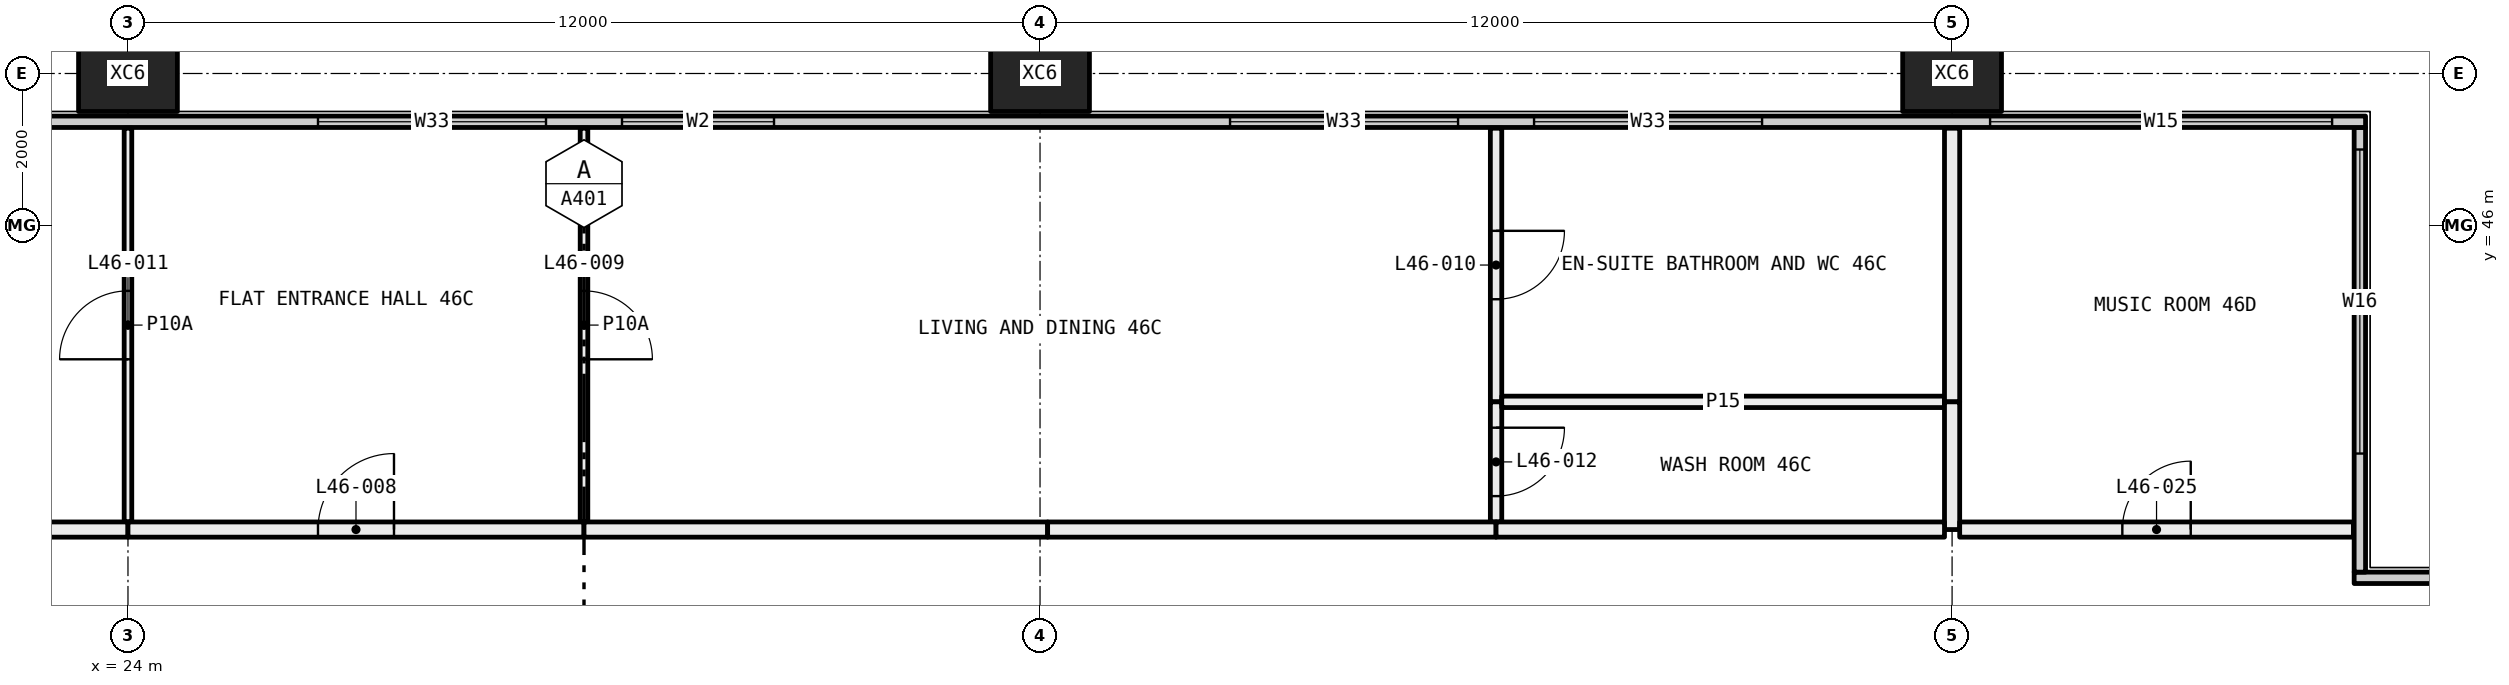
"""IFC4 building model, lengths in metres.
Left out: names, types, materials, properties, quantities, classifications, styles, units other than length and angle.
Written with IfcOpenShell. Run it as: python <this file> out.ifc"""

import sys

from ifc_helpers import new_model, si_unit, direction, frame, frame_2d, origin, origin_2d, place, context, subcontext, project, spatial, rectangle, hollow_rectangle, extrude, element, fill, save


model = new_model("IFC4")
c1 = context("Model", 3, precision=1e-05, world=origin(), true_north=direction((0.0, 1.0)))
c2 = subcontext(c1, "Body", "Model", "MODEL_VIEW")
j1 = project(units=[si_unit("LENGTHUNIT", "METRE"), si_unit("PLANEANGLEUNIT", "RADIAN")], contexts=[c1])
p1 = place(None, origin())
s1 = spatial("IfcSite", under=j1, at=p1, CompositionType="ELEMENT")
p2 = place(p1, origin())
s2 = spatial("IfcBuilding", under=s1, at=p2, CompositionType="ELEMENT")
p3 = place(p2, frame((0.0, 0.0, 175.5)))
s3 = spatial("IfcBuildingStorey", under=s2, at=p3, CompositionType="ELEMENT", Elevation=175.5)
for number, where, z_axis, x_axis in (
    (1, (24.0, 48.0, -0.4), (0.0, 0.0, 1.0), (1.0, 0.0, 0.0)),
    (2, (36.0, 48.0, -0.4), (0.0, 0.0, 1.0), (1.0, 0.0, 0.0)),
    (3, (48.0, 48.0, -0.4), (0.0, 0.0, 1.0), (1.0, 0.0, 0.0)),
):
    element("IfcColumn", number, at=place(p3, frame(where, z_axis=z_axis, x_axis=x_axis)), inside=s3, PredefinedType="COLUMN", context=c2, shape_type="SweptSolid", body=[
        extrude(hollow_rectangle(XDim=1.3, YDim=1.0, WallThickness=0.05, at=origin_2d()), origin(), (0.0, 0.0, 1.0), 3.45),
    ])
p4 = place(p3, frame((53.29, 41.365, 0.0), z_axis=(0.0, 0.0, 1.0), x_axis=(1.0, 0.0, 0.0)))
e4 = element("IfcWall", 4, at=p4, inside=s3, PredefinedType="ELEMENTEDWALL", context=c2, shape_type="SweptSolid", body=[
    extrude(rectangle(XDim=6.15, YDim=0.15, at=frame_2d((3.075, 0.0))), origin(), (0.0, 0.0, 1.0), 3.05),
])
p5 = place(p4, frame((1.71, 0.0, 0.45)))
e5 = element("IfcOpeningElement", 5, at=p5, cuts=e4, PredefinedType="OPENING", context=c2, shape_type="SweptSolid", body=[
    extrude(rectangle(XDim=4.0, YDim=2.55, at=frame_2d((2.0, 1.275))), frame((0.0, 0.085, 0.0), z_axis=(0.0, -1.0, 0.0), x_axis=(1.0, 0.0, 0.0)), (0.0, 0.0, 1.0), 0.17),
])
p6 = place(p3, frame((53.365, 41.44, 0.0), z_axis=(0.0, 0.0, 1.0), x_axis=(0.0, 1.0, 0.0)))
e6 = element("IfcWall", 6, at=p6, inside=s3, PredefinedType="ELEMENTEDWALL", context=c2, shape_type="SweptSolid", body=[
    extrude(rectangle(XDim=5.85, YDim=0.15, at=frame_2d((2.925, 0.0))), origin(), (0.0, 0.0, 1.0), 3.05),
])
p7 = place(p6, frame((1.56, 0.0, 0.45)))
e7 = element("IfcOpeningElement", 7, at=p7, cuts=e6, PredefinedType="OPENING", context=c2, shape_type="SweptSolid", body=[
    extrude(rectangle(XDim=4.0, YDim=2.55, at=frame_2d((2.0, 1.275))), frame((0.0, 0.085, 0.0), z_axis=(0.0, -1.0, 0.0), x_axis=(1.0, 0.0, 0.0)), (0.0, 0.0, 1.0), 0.17),
])
p8 = place(p3, frame((6.56, 47.365, 0.0), z_axis=(0.0, 0.0, 1.0), x_axis=(1.0, 0.0, 0.0)))
e8 = element("IfcWall", 8, at=p8, inside=s3, PredefinedType="ELEMENTEDWALL", context=c2, shape_type="SweptSolid", body=[
    extrude(rectangle(XDim=46.88, YDim=0.15, at=frame_2d((23.44, 0.0))), origin(), (0.0, 0.0, 1.0), 3.05),
])
p9 = place(p8, frame((0.44, 0.0, 0.45)))
e9 = element("IfcOpeningElement", 9, at=p9, cuts=e8, PredefinedType="OPENING", context=c2, shape_type="SweptSolid", body=[
    extrude(rectangle(XDim=4.5, YDim=2.55, at=frame_2d((2.25, 1.275))), frame((0.0, 0.085, 0.0), z_axis=(0.0, -1.0, 0.0), x_axis=(1.0, 0.0, 0.0)), (0.0, 0.0, 1.0), 0.17),
])
p10 = place(p8, frame((7.94, 0.0, 0.45)))
e10 = element("IfcOpeningElement", 10, at=p10, cuts=e8, PredefinedType="OPENING", context=c2, shape_type="SweptSolid", body=[
    extrude(rectangle(XDim=3.0, YDim=2.55, at=frame_2d((1.5, 1.275))), frame((0.0, 0.085, 0.0), z_axis=(0.0, -1.0, 0.0), x_axis=(1.0, 0.0, 0.0)), (0.0, 0.0, 1.0), 0.17),
])
p11 = place(p8, frame((11.94, 0.0, 0.45)))
e11 = element("IfcOpeningElement", 11, at=p11, cuts=e8, PredefinedType="OPENING", context=c2, shape_type="SweptSolid", body=[
    extrude(rectangle(XDim=3.0, YDim=2.55, at=frame_2d((1.5, 1.275))), frame((0.0, 0.085, 0.0), z_axis=(0.0, -1.0, 0.0), x_axis=(1.0, 0.0, 0.0)), (0.0, 0.0, 1.0), 0.17),
])
p12 = place(p8, frame((19.94, 0.0, 0.45)))
e12 = element("IfcOpeningElement", 12, at=p12, cuts=e8, PredefinedType="OPENING", context=c2, shape_type="SweptSolid", body=[
    extrude(rectangle(XDim=3.0, YDim=2.55, at=frame_2d((1.5, 1.275))), frame((0.0, 0.085, 0.0), z_axis=(0.0, -1.0, 0.0), x_axis=(1.0, 0.0, 0.0)), (0.0, 0.0, 1.0), 0.17),
])
p13 = place(p8, frame((23.94, 0.0, 0.45)))
e13 = element("IfcOpeningElement", 13, at=p13, cuts=e8, PredefinedType="OPENING", context=c2, shape_type="SweptSolid", body=[
    extrude(rectangle(XDim=2.0, YDim=2.55, at=frame_2d((1.0, 1.275))), frame((0.0, 0.085, 0.0), z_axis=(0.0, -1.0, 0.0), x_axis=(1.0, 0.0, 0.0)), (0.0, 0.0, 1.0), 0.17),
])
p14 = place(p8, frame((31.94, 0.0, 0.45)))
e14 = element("IfcOpeningElement", 14, at=p14, cuts=e8, PredefinedType="OPENING", context=c2, shape_type="SweptSolid", body=[
    extrude(rectangle(XDim=3.0, YDim=2.55, at=frame_2d((1.5, 1.275))), frame((0.0, 0.085, 0.0), z_axis=(0.0, -1.0, 0.0), x_axis=(1.0, 0.0, 0.0)), (0.0, 0.0, 1.0), 0.17),
])
p15 = place(p8, frame((35.94, 0.0, 0.45)))
e15 = element("IfcOpeningElement", 15, at=p15, cuts=e8, PredefinedType="OPENING", context=c2, shape_type="SweptSolid", body=[
    extrude(rectangle(XDim=3.0, YDim=2.55, at=frame_2d((1.5, 1.275))), frame((0.0, 0.085, 0.0), z_axis=(0.0, -1.0, 0.0), x_axis=(1.0, 0.0, 0.0)), (0.0, 0.0, 1.0), 0.17),
])
p16 = place(p8, frame((41.94, 0.0, 0.45)))
e16 = element("IfcOpeningElement", 16, at=p16, cuts=e8, PredefinedType="OPENING", context=c2, shape_type="SweptSolid", body=[
    extrude(rectangle(XDim=4.5, YDim=2.55, at=frame_2d((2.25, 1.275))), frame((0.0, 0.085, 0.0), z_axis=(0.0, -1.0, 0.0), x_axis=(1.0, 0.0, 0.0)), (0.0, 0.0, 1.0), 0.17),
])
p17 = place(p3, frame((24.0, 42.1, 0.0), z_axis=(0.0, 0.0, 1.0), x_axis=(0.0, 1.0, 0.0)))
e17 = element("IfcWall", 17, at=p17, inside=s3, PredefinedType="PARTITIONING", context=c2, shape_type="SweptSolid", body=[
    extrude(rectangle(XDim=5.18, YDim=0.1, at=frame_2d((2.59, 0.0))), origin(), (0.0, 0.0, 1.0), 3.05),
])
p18 = place(p17, frame((2.14, 0.0, 0.0)))
e18 = element("IfcOpeningElement", 18, at=p18, cuts=e17, PredefinedType="OPENING", context=c2, shape_type="SweptSolid", body=[
    extrude(rectangle(XDim=0.9, YDim=2.1, at=frame_2d((0.45, 1.05))), frame((0.0, 0.06, 0.0), z_axis=(0.0, -1.0, 0.0), x_axis=(1.0, 0.0, 0.0)), (0.0, 0.0, 1.0), 0.12),
])
p19 = place(p3, frame((18.0, 42.0, 0.0), z_axis=(0.0, 0.0, 1.0), x_axis=(1.0, 0.0, 0.0)))
e19 = element("IfcWall", 19, at=p19, inside=s3, PredefinedType="PARTITIONING", context=c2, shape_type="SweptSolid", body=[
    extrude(rectangle(XDim=6.0, YDim=0.2, at=frame_2d((3.0, 0.0))), origin(), (0.0, 0.0, 1.0), 3.05),
])
p20 = place(p3, frame((30.0, 42.1, 0.0), z_axis=(0.0, 0.0, 1.0), x_axis=(0.0, 1.0, 0.0)))
e20 = element("IfcWall", 20, at=p20, inside=s3, PredefinedType="PARTITIONING", context=c2, shape_type="SweptSolid", body=[
    extrude(rectangle(XDim=5.18, YDim=0.1, at=frame_2d((2.59, 0.0))), origin(), (0.0, 0.0, 1.0), 3.05),
])
p21 = place(p20, frame((2.14, 0.0, 0.0)))
e21 = element("IfcOpeningElement", 21, at=p21, cuts=e20, PredefinedType="OPENING", context=c2, shape_type="SweptSolid", body=[
    extrude(rectangle(XDim=0.9, YDim=2.1, at=frame_2d((0.45, 1.05))), frame((0.0, 0.06, 0.0), z_axis=(0.0, -1.0, 0.0), x_axis=(1.0, 0.0, 0.0)), (0.0, 0.0, 1.0), 0.12),
])
p22 = place(p3, frame((24.0, 42.0, 0.0), z_axis=(0.0, 0.0, 1.0), x_axis=(1.0, 0.0, 0.0)))
e22 = element("IfcWall", 22, at=p22, inside=s3, PredefinedType="PARTITIONING", context=c2, shape_type="SweptSolid", body=[
    extrude(rectangle(XDim=6.0, YDim=0.2, at=frame_2d((3.0, 0.0))), origin(), (0.0, 0.0, 1.0), 3.05),
])
p23 = place(p22, frame((2.5, 0.0, 0.0)))
e23 = element("IfcOpeningElement", 23, at=p23, cuts=e22, PredefinedType="OPENING", context=c2, shape_type="SweptSolid", body=[
    extrude(rectangle(XDim=1.0, YDim=2.1, at=frame_2d((0.5, 1.05))), frame((0.0, 0.11, 0.0), z_axis=(0.0, -1.0, 0.0), x_axis=(1.0, 0.0, 0.0)), (0.0, 0.0, 1.0), 0.22),
])
p24 = place(p3, frame((42.0, 43.68, 0.0), z_axis=(0.0, 0.0, 1.0), x_axis=(0.0, 1.0, 0.0)))
e24 = element("IfcWall", 24, at=p24, inside=s3, PredefinedType="PARTITIONING", context=c2, shape_type="SweptSolid", body=[
    extrude(rectangle(XDim=3.6, YDim=0.15, at=frame_2d((1.8, 0.0))), origin(), (0.0, 0.0, 1.0), 3.05),
])
p25 = place(p24, frame((1.35, 0.0, 0.0)))
e25 = element("IfcOpeningElement", 25, at=p25, cuts=e24, PredefinedType="OPENING", context=c2, shape_type="SweptSolid", body=[
    extrude(rectangle(XDim=0.9, YDim=2.1, at=frame_2d((0.45, 1.05))), frame((0.0, 0.085, 0.0), z_axis=(0.0, -1.0, 0.0), x_axis=(1.0, 0.0, 0.0)), (0.0, 0.0, 1.0), 0.17),
])
p26 = place(p3, frame((42.0, 42.1, 0.0), z_axis=(0.0, 0.0, 1.0), x_axis=(0.0, 1.0, 0.0)))
e26 = element("IfcWall", 26, at=p26, inside=s3, PredefinedType="PARTITIONING", context=c2, shape_type="SweptSolid", body=[
    extrude(rectangle(XDim=1.58, YDim=0.15, at=frame_2d((0.79, 0.0))), origin(), (0.0, 0.0, 1.0), 3.05),
])
p27 = place(p26, frame((0.34, 0.0, 0.0)))
e27 = element("IfcOpeningElement", 27, at=p27, cuts=e26, PredefinedType="OPENING", context=c2, shape_type="SweptSolid", body=[
    extrude(rectangle(XDim=0.9, YDim=2.1, at=frame_2d((0.45, 1.05))), frame((0.0, 0.085, 0.0), z_axis=(0.0, -1.0, 0.0), x_axis=(1.0, 0.0, 0.0)), (0.0, 0.0, 1.0), 0.17),
])
p28 = place(p3, frame((30.0, 42.0, 0.0), z_axis=(0.0, 0.0, 1.0), x_axis=(1.0, 0.0, 0.0)))
e28 = element("IfcWall", 28, at=p28, inside=s3, PredefinedType="PARTITIONING", context=c2, shape_type="SweptSolid", body=[
    extrude(rectangle(XDim=6.1, YDim=0.2, at=frame_2d((3.05, 0.0))), origin(), (0.0, 0.0, 1.0), 2.45),
])
p29 = place(p3, frame((36.1, 42.0, 0.0), z_axis=(0.0, 0.0, 1.0), x_axis=(1.0, 0.0, 0.0)))
e29 = element("IfcWall", 29, at=p29, inside=s3, PredefinedType="PARTITIONING", context=c2, shape_type="SweptSolid", body=[
    extrude(rectangle(XDim=5.9, YDim=0.2, at=frame_2d((2.95, 0.0))), origin(), (0.0, 0.0, 1.0), 3.05),
])
p30 = place(p3, frame((42.075, 43.68, 0.0), z_axis=(0.0, 0.0, 1.0), x_axis=(1.0, 0.0, 0.0)))
e30 = element("IfcWall", 30, at=p30, inside=s3, PredefinedType="PARTITIONING", context=c2, shape_type="SweptSolid", body=[
    extrude(rectangle(XDim=5.825, YDim=0.15, at=frame_2d((2.913, 0.0))), origin(), (0.0, 0.0, 1.0), 3.05),
])
p31 = place(p3, frame((48.0, 43.68, 0.0), z_axis=(0.0, 0.0, 1.0), x_axis=(0.0, 1.0, 0.0)))
e31 = element("IfcWall", 31, at=p31, inside=s3, PredefinedType="PARTITIONING", context=c2, shape_type="SweptSolid", body=[
    extrude(rectangle(XDim=3.6, YDim=0.2, at=frame_2d((1.8, 0.0))), origin(), (0.0, 0.0, 1.0), 3.05),
])
p32 = place(p3, frame((48.0, 42.0, 0.0), z_axis=(0.0, 0.0, 1.0), x_axis=(0.0, 1.0, 0.0)))
e32 = element("IfcWall", 32, at=p32, inside=s3, PredefinedType="PARTITIONING", context=c2, shape_type="SweptSolid", body=[
    extrude(rectangle(XDim=1.68, YDim=0.2, at=frame_2d((0.84, 0.0))), origin(), (0.0, 0.0, 1.0), 3.05),
])
p33 = place(p3, frame((42.0, 42.0, 0.0), z_axis=(0.0, 0.0, 1.0), x_axis=(1.0, 0.0, 0.0)))
e33 = element("IfcWall", 33, at=p33, inside=s3, PredefinedType="PARTITIONING", context=c2, shape_type="SweptSolid", body=[
    extrude(rectangle(XDim=5.9, YDim=0.2, at=frame_2d((2.95, 0.0))), origin(), (0.0, 0.0, 1.0), 3.05),
])
p34 = place(p3, frame((48.1, 42.0, 0.0), z_axis=(0.0, 0.0, 1.0), x_axis=(1.0, 0.0, 0.0)))
e34 = element("IfcWall", 34, at=p34, inside=s3, PredefinedType="PARTITIONING", context=c2, shape_type="SweptSolid", body=[
    extrude(rectangle(XDim=5.18, YDim=0.2, at=frame_2d((2.59, 0.0))), origin(), (0.0, 0.0, 1.0), 3.05),
])
p35 = place(p34, frame((2.14, 0.0, 0.0)))
e35 = element("IfcOpeningElement", 35, at=p35, cuts=e34, PredefinedType="OPENING", context=c2, shape_type="SweptSolid", body=[
    extrude(rectangle(XDim=0.9, YDim=2.1, at=frame_2d((0.45, 1.05))), frame((0.0, 0.11, 0.0), z_axis=(0.0, -1.0, 0.0), x_axis=(1.0, 0.0, 0.0)), (0.0, 0.0, 1.0), 0.22),
])
p36 = place(p7, origin())
e36 = element("IfcWindow", 36, at=p36, inside=s3, PartitioningType="SINGLE_PANEL", PredefinedType="WINDOW", context=c2, shape_type="SweptSolid", body=[
    extrude(rectangle(XDim=4.0, YDim=2.55, at=frame_2d((2.0, 1.275))), frame((0.0, 0.03, 0.0), z_axis=(0.0, -1.0, 0.0), x_axis=(1.0, 0.0, 0.0)), (0.0, 0.0, 1.0), 0.06),
])
fill(e7, e36)
p37 = place(p12, origin())
e37 = element("IfcWindow", 37, at=p37, inside=s3, PartitioningType="SINGLE_PANEL", PredefinedType="WINDOW", context=c2, shape_type="SweptSolid", body=[
    extrude(rectangle(XDim=3.0, YDim=2.55, at=frame_2d((1.5, 1.275))), frame((0.0, 0.03, 0.0), z_axis=(0.0, -1.0, 0.0), x_axis=(1.0, 0.0, 0.0)), (0.0, 0.0, 1.0), 0.06),
])
fill(e12, e37)
p38 = place(p13, origin())
e38 = element("IfcWindow", 38, at=p38, inside=s3, PartitioningType="SINGLE_PANEL", PredefinedType="WINDOW", context=c2, shape_type="SweptSolid", body=[
    extrude(rectangle(XDim=2.0, YDim=2.55, at=frame_2d((1.0, 1.275))), frame((0.0, 0.03, 0.0), z_axis=(0.0, -1.0, 0.0), x_axis=(1.0, 0.0, 0.0)), (0.0, 0.0, 1.0), 0.06),
])
fill(e13, e38)
p39 = place(p14, origin())
e39 = element("IfcWindow", 39, at=p39, inside=s3, PartitioningType="SINGLE_PANEL", PredefinedType="WINDOW", context=c2, shape_type="SweptSolid", body=[
    extrude(rectangle(XDim=3.0, YDim=2.55, at=frame_2d((1.5, 1.275))), frame((0.0, 0.03, 0.0), z_axis=(0.0, -1.0, 0.0), x_axis=(1.0, 0.0, 0.0)), (0.0, 0.0, 1.0), 0.06),
])
fill(e14, e39)
p40 = place(p15, origin())
e40 = element("IfcWindow", 40, at=p40, inside=s3, PartitioningType="SINGLE_PANEL", PredefinedType="WINDOW", context=c2, shape_type="SweptSolid", body=[
    extrude(rectangle(XDim=3.0, YDim=2.55, at=frame_2d((1.5, 1.275))), frame((0.0, 0.03, 0.0), z_axis=(0.0, -1.0, 0.0), x_axis=(1.0, 0.0, 0.0)), (0.0, 0.0, 1.0), 0.06),
])
fill(e15, e40)
p41 = place(p16, origin())
e41 = element("IfcWindow", 41, at=p41, inside=s3, PartitioningType="SINGLE_PANEL", PredefinedType="WINDOW", context=c2, shape_type="SweptSolid", body=[
    extrude(rectangle(XDim=4.5, YDim=2.55, at=frame_2d((2.25, 1.275))), frame((0.0, 0.03, 0.0), z_axis=(0.0, -1.0, 0.0), x_axis=(1.0, 0.0, 0.0)), (0.0, 0.0, 1.0), 0.06),
])
fill(e16, e41)
p42 = place(p23, origin())
e42 = element("IfcDoor", 42, at=p42, inside=s3, OperationType="SINGLE_SWING_LEFT", PredefinedType="DOOR", context=c2, shape_type="SweptSolid", body=[
    extrude(rectangle(XDim=1.0, YDim=2.1, at=frame_2d((0.5, 1.05))), frame((0.0, 0.025, 0.0), z_axis=(0.0, -1.0, 0.0), x_axis=(1.0, 0.0, 0.0)), (0.0, 0.0, 1.0), 0.05),
])
fill(e23, e42)
p43 = place(p21, frame((0.9, 0.0, 0.0), x_axis=(-1.0, 0.0, 0.0)))
e43 = element("IfcDoor", 43, at=p43, inside=s3, OperationType="SINGLE_SWING_LEFT", PredefinedType="DOOR", context=c2, shape_type="SweptSolid", body=[
    extrude(rectangle(XDim=0.9, YDim=2.1, at=frame_2d((0.45, 1.05))), frame((0.0, 0.025, 0.0), z_axis=(0.0, -1.0, 0.0), x_axis=(1.0, 0.0, 0.0)), (0.0, 0.0, 1.0), 0.05),
])
fill(e21, e43)
p44 = place(p25, frame((0.9, 0.0, 0.0), x_axis=(-1.0, 0.0, 0.0)))
e44 = element("IfcDoor", 44, at=p44, inside=s3, OperationType="SINGLE_SWING_RIGHT", PredefinedType="DOOR", context=c2, shape_type="SweptSolid", body=[
    extrude(rectangle(XDim=0.9, YDim=2.1, at=frame_2d((0.45, 1.05))), frame((0.0, 0.025, 0.0), z_axis=(0.0, -1.0, 0.0), x_axis=(1.0, 0.0, 0.0)), (0.0, 0.0, 1.0), 0.05),
])
fill(e25, e44)
p45 = place(p18, origin())
e45 = element("IfcDoor", 45, at=p45, inside=s3, OperationType="SINGLE_SWING_RIGHT", PredefinedType="DOOR", context=c2, shape_type="SweptSolid", body=[
    extrude(rectangle(XDim=0.9, YDim=2.1, at=frame_2d((0.45, 1.05))), frame((0.0, 0.025, 0.0), z_axis=(0.0, -1.0, 0.0), x_axis=(1.0, 0.0, 0.0)), (0.0, 0.0, 1.0), 0.05),
])
fill(e18, e45)
p46 = place(p27, frame((0.9, 0.0, 0.0), x_axis=(-1.0, 0.0, 0.0)))
e46 = element("IfcDoor", 46, at=p46, inside=s3, OperationType="SINGLE_SWING_RIGHT", PredefinedType="DOOR", context=c2, shape_type="SweptSolid", body=[
    extrude(rectangle(XDim=0.9, YDim=2.1, at=frame_2d((0.45, 1.05))), frame((0.0, 0.025, 0.0), z_axis=(0.0, -1.0, 0.0), x_axis=(1.0, 0.0, 0.0)), (0.0, 0.0, 1.0), 0.05),
])
fill(e27, e46)
p47 = place(p35, origin())
e47 = element("IfcDoor", 47, at=p47, inside=s3, OperationType="SINGLE_SWING_LEFT", PredefinedType="DOOR", context=c2, shape_type="SweptSolid", body=[
    extrude(rectangle(XDim=0.9, YDim=2.1, at=frame_2d((0.45, 1.05))), frame((0.0, 0.025, 0.0), z_axis=(0.0, -1.0, 0.0), x_axis=(1.0, 0.0, 0.0)), (0.0, 0.0, 1.0), 0.05),
])
fill(e35, e47)
save(model, sys.argv[1])
